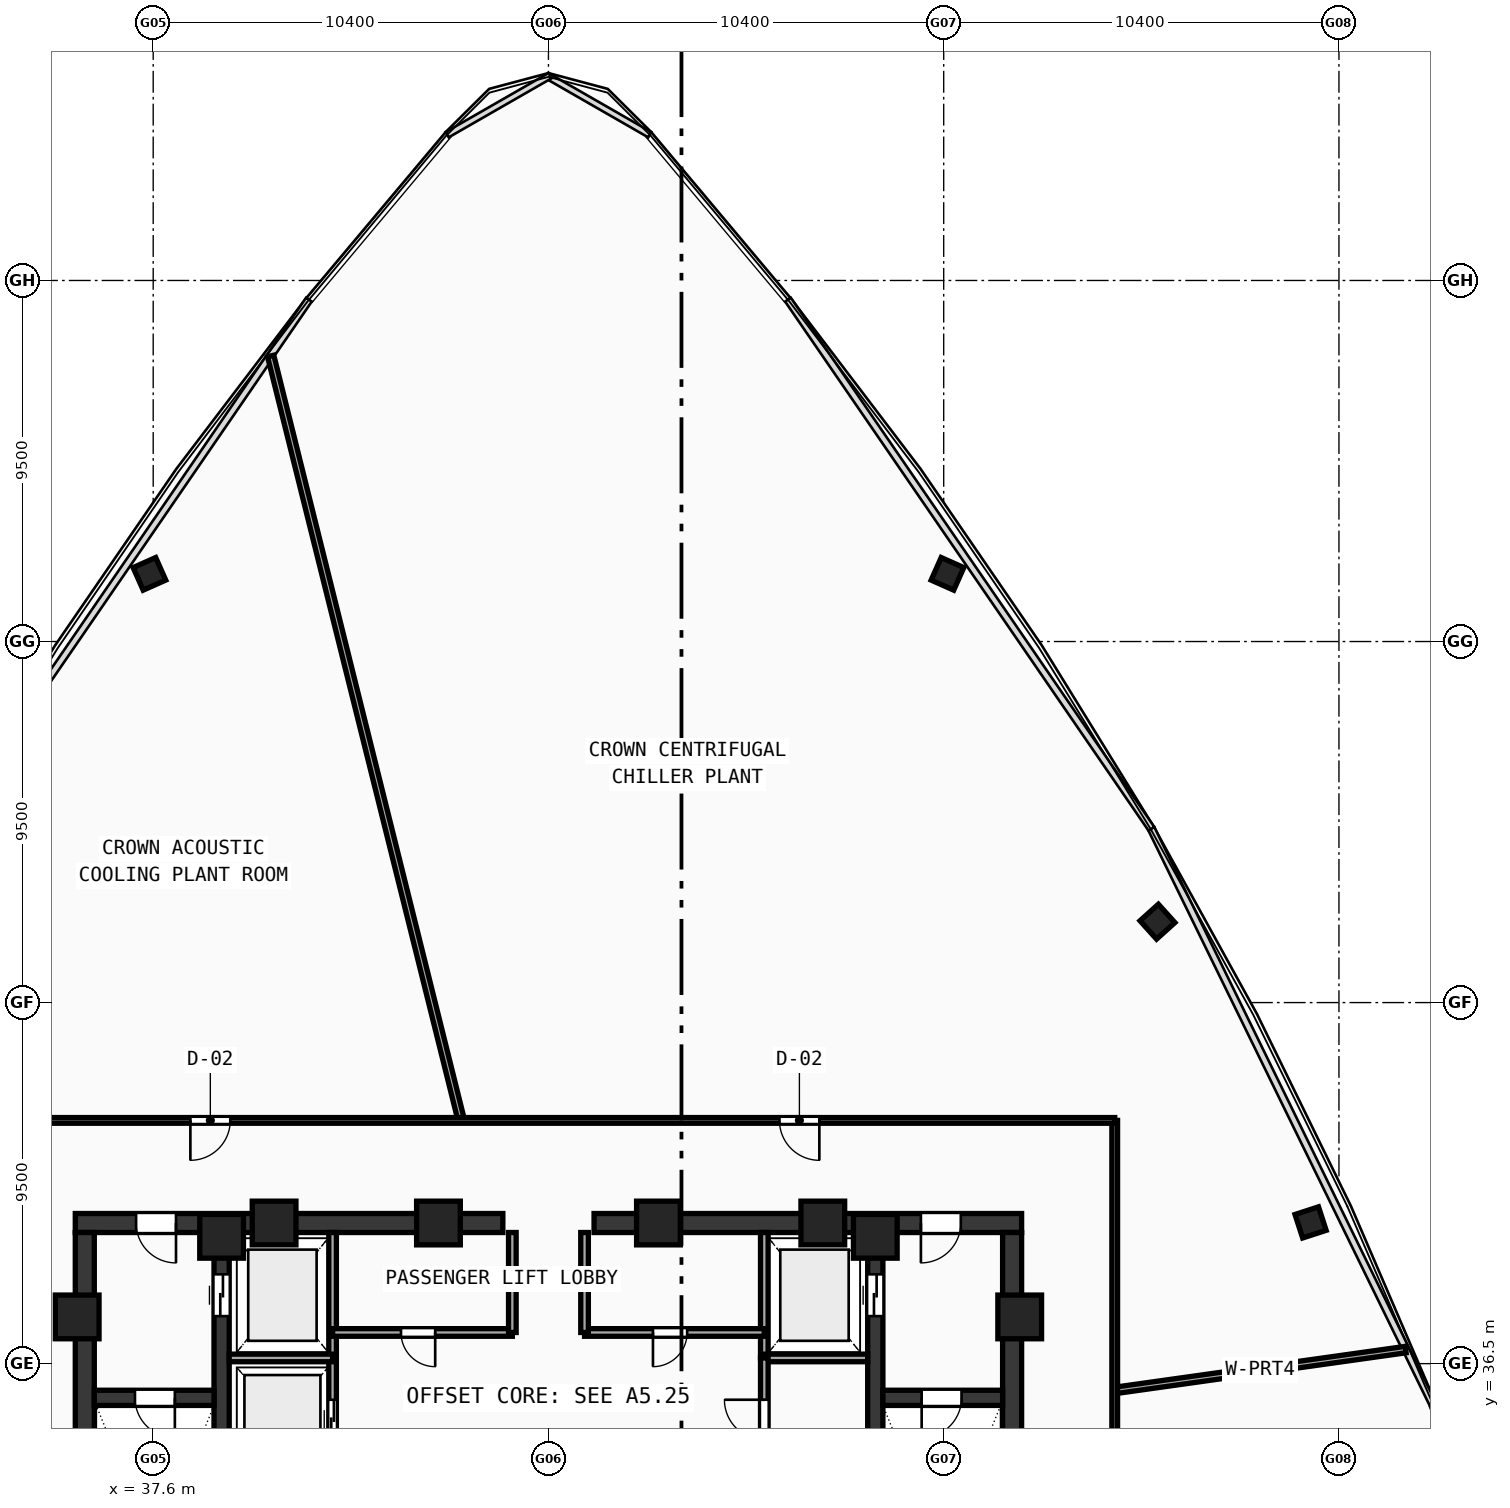
"""IFC4 building model, lengths in metres.
Left out: names, types, materials, properties, quantities, classifications, styles, units other than length and angle.
Written with IfcOpenShell. Run it as: python <this file> out.ifc"""

import sys

from ifc_helpers import new_model, si_unit, direction, frame, frame_2d, origin, origin_with_axes, origin_2d, place, context, subcontext, project, spatial, rectangle, hollow_rectangle, extrude, source, transform, mapped, element, fill, save


model = new_model("IFC4")
c1 = context("Model", 3, precision=1e-05, world=origin(), true_north=direction((0.0, 1.0)))
c2 = subcontext(c1, "Body", "Model", "MODEL_VIEW")
j1 = project(units=[si_unit("LENGTHUNIT", "METRE"), si_unit("PLANEANGLEUNIT", "RADIAN")], contexts=[c1])
p1 = place(None, origin())
s1 = spatial("IfcSite", under=j1, at=p1, CompositionType="ELEMENT")
p2 = place(p1, origin())
s2 = spatial("IfcBuilding", under=s1, at=p2, CompositionType="ELEMENT")
p3 = place(p2, frame((0.0, 0.0, 396.76)))
s3 = spatial("IfcBuildingStorey", under=s2, at=p3, CompositionType="ELEMENT", Elevation=396.76)
p4 = place(p3, frame((35.55, 40.2, 0.0), z_axis=(0.0, 0.0, 1.0), x_axis=(1.0, 0.0, 0.0)))
e1 = element("IfcWall", 1, at=p4, inside=s3, PredefinedType="SHEAR", context=c2, shape_type="SweptSolid", body=[
    extrude(rectangle(XDim=11.25, YDim=0.5, at=frame_2d((5.625, 0.0))), origin(), (0.0, 0.0, 1.0), 4.72),
])
p5 = place(p4, frame((1.6, 0.0, 0.0)))
e2 = element("IfcOpeningElement", 2, at=p5, cuts=e1, PredefinedType="OPENING", context=c2, shape_type="SweptSolid", body=[
    extrude(rectangle(XDim=1.05, YDim=2.1, at=frame_2d((0.525, 1.05))), frame((0.0, 0.26, 0.0), z_axis=(0.0, -1.0, 0.0), x_axis=(1.0, 0.0, 0.0)), (0.0, 0.0, 1.0), 0.52),
])
p6 = place(p3, frame((49.2, 40.2, 0.0), z_axis=(0.0, 0.0, 1.0), x_axis=(1.0, 0.0, 0.0)))
e3 = element("IfcWall", 3, at=p6, inside=s3, PredefinedType="SHEAR", context=c2, shape_type="SweptSolid", body=[
    extrude(rectangle(XDim=11.25, YDim=0.5, at=frame_2d((5.625, 0.0))), origin(), (0.0, 0.0, 1.0), 4.72),
])
p7 = place(p6, frame((8.6, 0.0, 0.0)))
e4 = element("IfcOpeningElement", 4, at=p7, cuts=e3, PredefinedType="OPENING", context=c2, shape_type="SweptSolid", body=[
    extrude(rectangle(XDim=1.05, YDim=2.1, at=frame_2d((0.525, 1.05))), frame((0.0, 0.26, 0.0), z_axis=(0.0, -1.0, 0.0), x_axis=(1.0, 0.0, 0.0)), (0.0, 0.0, 1.0), 0.52),
])
for number, where, z_axis, x_axis in (
    (5, (35.8, 27.75, 0.0), (0.0, 0.0, 1.0), (0.0, 1.0, 0.0)),
    (6, (60.2, 27.75, 0.0), (0.0, 0.0, 1.0), (0.0, 1.0, 0.0)),
):
    element("IfcWall", number, at=place(p3, frame(where, z_axis=z_axis, x_axis=x_axis)), inside=s3, PredefinedType="SHEAR", context=c2, shape_type="SweptSolid", body=[
        extrude(rectangle(XDim=12.2, YDim=0.5, at=frame_2d((6.1, 0.0))), origin(), (0.0, 0.0, 1.0), 4.72),
    ])
p8 = place(p3, frame((39.4, 27.75, 0.0), z_axis=(0.0, 0.0, 1.0), x_axis=(0.0, 1.0, 0.0)))
e7 = element("IfcWall", 7, at=p8, inside=s3, PredefinedType="SHEAR", context=c2, shape_type="SweptSolid", body=[
    extrude(rectangle(XDim=12.2, YDim=0.4, at=frame_2d((6.1, 0.0))), origin(), (0.0, 0.0, 1.0), 4.72),
])
p9 = place(p8, frame((10.0, 0.0, 0.0)))
e8 = element("IfcOpeningElement", 8, at=p9, cuts=e7, PredefinedType="OPENING", context=c2, shape_type="SweptSolid", body=[
    extrude(rectangle(XDim=1.1, YDim=2.1, at=frame_2d((0.55, 1.05))), frame((0.0, 0.21, 0.0), z_axis=(0.0, -1.0, 0.0), x_axis=(1.0, 0.0, 0.0)), (0.0, 0.0, 1.0), 0.42),
])
p10 = place(p3, frame((56.6, 27.75, 0.0), z_axis=(0.0, 0.0, 1.0), x_axis=(0.0, 1.0, 0.0)))
e9 = element("IfcWall", 9, at=p10, inside=s3, PredefinedType="SHEAR", context=c2, shape_type="SweptSolid", body=[
    extrude(rectangle(XDim=12.2, YDim=0.4, at=frame_2d((6.1, 0.0))), origin(), (0.0, 0.0, 1.0), 4.72),
])
p11 = place(p10, frame((10.0, 0.0, 0.0)))
e10 = element("IfcOpeningElement", 10, at=p11, cuts=e9, PredefinedType="OPENING", context=c2, shape_type="SweptSolid", body=[
    extrude(rectangle(XDim=1.1, YDim=2.1, at=frame_2d((0.55, 1.05))), frame((0.0, 0.21, 0.0), z_axis=(0.0, -1.0, 0.0), x_axis=(1.0, 0.0, 0.0)), (0.0, 0.0, 1.0), 0.42),
])
p12 = place(p3, frame((36.05, 35.6, 0.0), z_axis=(0.0, 0.0, 1.0), x_axis=(1.0, 0.0, 0.0)))
e11 = element("IfcWall", 11, at=p12, inside=s3, PredefinedType="SHEAR", context=c2, shape_type="SweptSolid", body=[
    extrude(rectangle(XDim=3.15, YDim=0.4, at=frame_2d((1.575, 0.0))), origin(), (0.0, 0.0, 1.0), 4.72),
])
p13 = place(p12, frame((1.07, 0.0, 0.0)))
e12 = element("IfcOpeningElement", 12, at=p13, cuts=e11, PredefinedType="OPENING", context=c2, shape_type="SweptSolid", body=[
    extrude(rectangle(XDim=1.05, YDim=2.1, at=frame_2d((0.525, 1.05))), frame((0.0, 0.21, 0.0), z_axis=(0.0, -1.0, 0.0), x_axis=(1.0, 0.0, 0.0)), (0.0, 0.0, 1.0), 0.42),
])
p14 = place(p3, frame((56.8, 35.6, 0.0), z_axis=(0.0, 0.0, 1.0), x_axis=(1.0, 0.0, 0.0)))
e13 = element("IfcWall", 13, at=p14, inside=s3, PredefinedType="SHEAR", context=c2, shape_type="SweptSolid", body=[
    extrude(rectangle(XDim=3.15, YDim=0.4, at=frame_2d((1.575, 0.0))), origin(), (0.0, 0.0, 1.0), 4.72),
])
p15 = place(p14, frame((1.02, 0.0, 0.0)))
e14 = element("IfcOpeningElement", 14, at=p15, cuts=e13, PredefinedType="OPENING", context=c2, shape_type="SweptSolid", body=[
    extrude(rectangle(XDim=1.05, YDim=2.1, at=frame_2d((0.525, 1.05))), frame((0.0, 0.21, 0.0), z_axis=(0.0, -1.0, 0.0), x_axis=(1.0, 0.0, 0.0)), (0.0, 0.0, 1.0), 0.42),
])
m1 = source(origin(), c2, "Body", "SweptSolid", [
    extrude(hollow_rectangle(XDim=1.15, YDim=1.15, WallThickness=0.048, at=origin_2d()), origin(), (0.0, 0.0, 1.0), 5.0),
])
for number, where, z_axis, x_axis in (
    (15, (60.4, 37.729, -0.28), (0.0, 0.0, 1.0), (1.0, 0.0, 0.0)),
    (16, (55.219, 40.2, -0.28), (0.0, 0.0, 1.0), (1.0, 0.0, 0.0)),
    (17, (50.894, 40.2, -0.28), (0.0, 0.0, 1.0), (1.0, 0.0, 0.0)),
    (18, (45.106, 40.2, -0.28), (0.0, 0.0, 1.0), (1.0, 0.0, 0.0)),
    (19, (40.781, 40.2, -0.28), (0.0, 0.0, 1.0), (1.0, 0.0, 0.0)),
    (20, (35.6, 37.729, -0.28), (0.0, 0.0, 1.0), (1.0, 0.0, 0.0)),
):
    element("IfcColumn", number, at=place(p3, frame(where, z_axis=z_axis, x_axis=x_axis)), inside=s3, PredefinedType="COLUMN", context=c2, shape_type="MappedRepresentation", body=[
        mapped(m1, transform((0.0, 0.0, 0.0), scale=1.0)),
    ])
m2 = source(origin(), c2, "Body", "SweptSolid", [
    extrude(hollow_rectangle(XDim=0.65, YDim=0.65, WallThickness=0.024, at=origin_2d()), origin(), (0.0, 0.0, 1.0), 5.0),
])
for number, where, z_axis, x_axis in (
    (21, (68.053, 40.216, -0.28), (0.0, 0.0, 1.0), (-0.309, 0.951, 0.0)),
    (22, (64.025, 48.129, -0.28), (0.0, 0.0, 1.0), (-0.669, 0.743, 0.0)),
    (23, (58.499, 57.281, -0.28), (0.0, 0.0, 1.0), (-0.914, 0.407, 0.0)),
    (24, (37.501, 57.281, -0.28), (0.0, 0.0, 1.0), (-0.914, -0.407, 0.0)),
):
    element("IfcColumn", number, at=place(p3, frame(where, z_axis=z_axis, x_axis=x_axis)), inside=s3, PredefinedType="COLUMN", context=c2, shape_type="MappedRepresentation", body=[
        mapped(m2, transform((0.0, 0.0, 0.0), scale=1.0)),
    ])
for number, where, z_axis, x_axis in (
    (25, (39.4, 39.85, -0.28), (0.0, 0.0, 1.0), (1.0, 0.0, 0.0)),
    (26, (56.6, 39.85, -0.28), (0.0, 0.0, 1.0), (1.0, 0.0, 0.0)),
):
    element("IfcColumn", number, at=place(p3, frame(where, z_axis=z_axis, x_axis=x_axis)), inside=s3, PredefinedType="COLUMN", context=c2, shape_type="MappedRepresentation", body=[
        mapped(m1, transform((0.0, 0.0, 0.0), scale=1.0)),
    ])
p16 = place(p3, frame((42.32, 33.5, 0.0), z_axis=(0.0, 0.0, 1.0), x_axis=(0.0, 1.0, 0.0)))
e27 = element("IfcWall", 27, at=p16, inside=s3, PredefinedType="SOLIDWALL", context=c2, shape_type="SweptSolid", body=[
    extrude(rectangle(XDim=6.45, YDim=0.2, at=frame_2d((3.225, 0.0))), origin(), (0.0, 0.0, 1.0), 4.72),
])
p17 = place(p16, frame((1.0, 0.0, 0.0)))
e28 = element("IfcOpeningElement", 28, at=p17, cuts=e27, PredefinedType="OPENING", context=c2, shape_type="SweptSolid", body=[
    extrude(rectangle(XDim=1.05, YDim=2.1, at=frame_2d((0.525, 1.05))), frame((0.0, 0.11, 0.0), z_axis=(0.0, -1.0, 0.0), x_axis=(1.0, 0.0, 0.0)), (0.0, 0.0, 1.0), 0.22),
])
p18 = place(p3, frame((39.6, 36.65, 0.0), z_axis=(0.0, 0.0, 1.0), x_axis=(1.0, 0.0, 0.0)))
e29 = element("IfcWall", 29, at=p18, inside=s3, PredefinedType="SOLIDWALL", context=c2, shape_type="SweptSolid", body=[
    extrude(rectangle(XDim=2.72, YDim=0.2, at=frame_2d((1.36, 0.0))), origin(), (0.0, 0.0, 1.0), 4.72),
])
p19 = place(p3, frame((53.68, 36.65, 0.0), z_axis=(0.0, 0.0, 1.0), x_axis=(0.0, 1.0, 0.0)))
e30 = element("IfcWall", 30, at=p19, inside=s3, PredefinedType="SOLIDWALL", context=c2, shape_type="SweptSolid", body=[
    extrude(rectangle(XDim=3.3, YDim=0.2, at=frame_2d((1.65, 0.0))), origin(), (0.0, 0.0, 1.0), 4.72),
])
p20 = place(p3, frame((53.68, 36.65, 0.0), z_axis=(0.0, 0.0, 1.0), x_axis=(1.0, 0.0, 0.0)))
e31 = element("IfcWall", 31, at=p20, inside=s3, PredefinedType="SOLIDWALL", context=c2, shape_type="SweptSolid", body=[
    extrude(rectangle(XDim=2.72, YDim=0.2, at=frame_2d((1.36, 0.0))), origin(), (0.0, 0.0, 1.0), 4.72),
])
p21 = place(p3, frame((42.32, 37.32, 0.0), z_axis=(0.0, 0.0, 1.0), x_axis=(1.0, 0.0, 0.0)))
e32 = element("IfcWall", 32, at=p21, inside=s3, PredefinedType="SOLIDWALL", context=c2, shape_type="SweptSolid", body=[
    extrude(rectangle(XDim=4.73, YDim=0.2, at=frame_2d((2.365, 0.0))), origin(), (0.0, 0.0, 1.0), 4.72),
])
p22 = place(p21, frame((1.8, 0.0, 0.0)))
e33 = element("IfcOpeningElement", 33, at=p22, cuts=e32, PredefinedType="OPENING", context=c2, shape_type="SweptSolid", body=[
    extrude(rectangle(XDim=0.9, YDim=2.1, at=frame_2d((0.45, 1.05))), frame((0.0, 0.11, 0.0), z_axis=(0.0, -1.0, 0.0), x_axis=(1.0, 0.0, 0.0)), (0.0, 0.0, 1.0), 0.22),
])
p23 = place(p3, frame((48.95, 37.32, 0.0), z_axis=(0.0, 0.0, 1.0), x_axis=(1.0, 0.0, 0.0)))
e34 = element("IfcWall", 34, at=p23, inside=s3, PredefinedType="SOLIDWALL", context=c2, shape_type="SweptSolid", body=[
    extrude(rectangle(XDim=4.73, YDim=0.2, at=frame_2d((2.365, 0.0))), origin(), (0.0, 0.0, 1.0), 4.72),
])
p24 = place(p23, frame((1.8, 0.0, 0.0)))
e35 = element("IfcOpeningElement", 35, at=p24, cuts=e34, PredefinedType="OPENING", context=c2, shape_type="SweptSolid", body=[
    extrude(rectangle(XDim=0.9, YDim=2.1, at=frame_2d((0.45, 1.05))), frame((0.0, 0.11, 0.0), z_axis=(0.0, -1.0, 0.0), x_axis=(1.0, 0.0, 0.0)), (0.0, 0.0, 1.0), 0.22),
])
for number, where, z_axis, x_axis in (
    (36, (47.05, 37.32, 0.0), (0.0, 0.0, 1.0), (0.0, 1.0, 0.0)),
    (37, (48.95, 37.32, 0.0), (0.0, 0.0, 1.0), (0.0, 1.0, 0.0)),
):
    element("IfcWall", number, at=place(p3, frame(where, z_axis=z_axis, x_axis=x_axis)), inside=s3, PredefinedType="SOLIDWALL", context=c2, shape_type="SweptSolid", body=[
        extrude(rectangle(XDim=2.63, YDim=0.2, at=frame_2d((1.315, 0.0))), origin(), (0.0, 0.0, 1.0), 4.72),
    ])
p25 = place(p3, frame((53.68, 27.6, 0.0), z_axis=(0.0, 0.0, 1.0), x_axis=(0.0, 1.0, 0.0)))
e38 = element("IfcWall", 38, at=p25, inside=s3, PredefinedType="SOLIDWALL", context=c2, shape_type="SweptSolid", body=[
    extrude(rectangle(XDim=9.05, YDim=0.2, at=frame_2d((4.525, 0.0))), origin(), (0.0, 0.0, 1.0), 4.72),
])
p26 = place(p25, frame((6.9, 0.0, 0.0)))
e39 = element("IfcOpeningElement", 39, at=p26, cuts=e38, PredefinedType="OPENING", context=c2, shape_type="SweptSolid", body=[
    extrude(rectangle(XDim=1.05, YDim=2.1, at=frame_2d((0.525, 1.05))), frame((0.0, 0.11, 0.0), z_axis=(0.0, -1.0, 0.0), x_axis=(1.0, 0.0, 0.0)), (0.0, 0.0, 1.0), 0.22),
])
p27 = place(p3, frame((62.9, 35.794, 0.0), z_axis=(0.0, 0.0, 1.0), x_axis=(0.990268414718, 0.139170639188, 0.0)))
e40 = element("IfcWall", 40, at=p27, inside=s3, PredefinedType="PARTITIONING", context=c2, shape_type="SweptSolid", body=[
    extrude(rectangle(XDim=7.731, YDim=0.17, at=frame_2d((3.865, 0.0))), origin(), (0.0, 0.0, 1.0), 4.12),
])
p28 = place(p3, frame((45.706, 42.9, 0.0), z_axis=(0.0, 0.0, 1.0), x_axis=(-0.241925907535, 0.970294725979, 0.0)))
e41 = element("IfcWall", 41, at=p28, inside=s3, PredefinedType="PARTITIONING", context=c2, shape_type="SweptSolid", body=[
    extrude(rectangle(XDim=20.729, YDim=0.17, at=frame_2d((10.365, 0.0))), origin(), (0.0, 0.0, 1.0), 4.12),
])
p29 = place(p3, frame((62.9, 24.9, 0.0), z_axis=(0.0, 0.0, 1.0), x_axis=(0.0, 1.0, 0.0)))
e42 = element("IfcWall", 42, at=p29, inside=s3, PredefinedType="PARTITIONING", context=c2, shape_type="SweptSolid", body=[
    extrude(rectangle(XDim=18.0, YDim=0.15, at=frame_2d((9.0, 0.0))), origin(), (0.0, 0.0, 1.0), 4.12),
])
p30 = place(p3, frame((62.9, 42.9, 0.0), z_axis=(0.0, 0.0, 1.0), x_axis=(-1.0, 0.0, 0.0)))
e43 = element("IfcWall", 43, at=p30, inside=s3, PredefinedType="PARTITIONING", context=c2, shape_type="SweptSolid", body=[
    extrude(rectangle(XDim=29.8, YDim=0.15, at=frame_2d((14.9, 0.0))), origin(), (0.0, 0.0, 1.0), 4.12),
])
p31 = place(p30, frame((7.772, 0.0, 0.0)))
e44 = element("IfcOpeningElement", 44, at=p31, cuts=e43, PredefinedType="OPENING", context=c2, shape_type="SweptSolid", body=[
    extrude(rectangle(XDim=1.05, YDim=2.1, at=frame_2d((0.525, 1.05))), frame((0.0, 0.085, 0.0), z_axis=(0.0, -1.0, 0.0), x_axis=(1.0, 0.0, 0.0)), (0.0, 0.0, 1.0), 0.17),
])
p32 = place(p30, frame((23.272, 0.0, 0.0)))
e45 = element("IfcOpeningElement", 45, at=p32, cuts=e43, PredefinedType="OPENING", context=c2, shape_type="SweptSolid", body=[
    extrude(rectangle(XDim=1.05, YDim=2.1, at=frame_2d((0.525, 1.05))), frame((0.0, 0.085, 0.0), z_axis=(0.0, -1.0, 0.0), x_axis=(1.0, 0.0, 0.0)), (0.0, 0.0, 1.0), 0.17),
])
m3 = source(origin(), c2, "Body", "SweptSolid", [
    extrude(rectangle(XDim=1.05, YDim=2.1, at=frame_2d((0.525, 1.05))), frame((0.0, 0.025, 0.0), z_axis=(0.0, -1.0, 0.0), x_axis=(1.0, 0.0, 0.0)), (0.0, 0.0, 1.0), 0.05),
])
p33 = place(p13, frame((1.05, 0.0, 0.0), z_axis=(0.0, 0.0, 1.0), x_axis=(-1.0, 0.0, 0.0)))
e46 = element("IfcDoor", 46, at=p33, inside=s3, OperationType="SINGLE_SWING_LEFT", PredefinedType="DOOR", context=c2, shape_type="MappedRepresentation", body=[
    mapped(m3, transform((0.0, 0.0, 0.0), scale=1.0)),
])
fill(e12, e46)
p34 = place(p15, frame((1.05, 0.0, 0.0), z_axis=(0.0, 0.0, 1.0), x_axis=(-1.0, 0.0, 0.0)))
e47 = element("IfcDoor", 47, at=p34, inside=s3, OperationType="SINGLE_SWING_RIGHT", PredefinedType="DOOR", context=c2, shape_type="MappedRepresentation", body=[
    mapped(m3, transform((0.0, 0.0, 0.0), scale=1.0)),
])
fill(e14, e47)
p35 = place(p5, frame((1.05, 0.0, 0.0), z_axis=(0.0, 0.0, 1.0), x_axis=(-1.0, 0.0, 0.0)))
e48 = element("IfcDoor", 48, at=p35, inside=s3, OperationType="SINGLE_SWING_LEFT", PredefinedType="DOOR", context=c2, shape_type="MappedRepresentation", body=[
    mapped(m3, transform((0.0, 0.0, 0.0), scale=1.0)),
])
fill(e2, e48)
p36 = place(p7, frame((1.05, 0.0, 0.0), z_axis=(0.0, 0.0, 1.0), x_axis=(-1.0, 0.0, 0.0)))
e49 = element("IfcDoor", 49, at=p36, inside=s3, OperationType="SINGLE_SWING_RIGHT", PredefinedType="DOOR", context=c2, shape_type="MappedRepresentation", body=[
    mapped(m3, transform((0.0, 0.0, 0.0), scale=1.0)),
])
fill(e4, e49)
m4 = source(origin(), c2, "Body", "SweptSolid", [
    extrude(rectangle(XDim=1.1, YDim=2.1, at=frame_2d((0.55, 1.05))), frame((0.0, 0.025, 0.0), z_axis=(0.0, -1.0, 0.0), x_axis=(1.0, 0.0, 0.0)), (0.0, 0.0, 1.0), 0.05),
])
p37 = place(p9, frame((1.1, 0.0, 0.0), z_axis=(0.0, 0.0, 1.0), x_axis=(-1.0, 0.0, 0.0)))
e50 = element("IfcDoor", 50, at=p37, inside=s3, OperationType="DOUBLE_DOOR_SLIDING", PredefinedType="DOOR", context=c2, shape_type="MappedRepresentation", body=[
    mapped(m4, transform((0.0, 0.0, 0.0), scale=1.0)),
])
fill(e8, e50)
p38 = place(p11, origin_with_axes())
e51 = element("IfcDoor", 51, at=p38, inside=s3, OperationType="DOUBLE_DOOR_SLIDING", PredefinedType="DOOR", context=c2, shape_type="MappedRepresentation", body=[
    mapped(m4, transform((0.0, 0.0, 0.0), scale=1.0)),
])
fill(e10, e51)
p39 = place(p17, origin_with_axes())
e52 = element("IfcDoor", 52, at=p39, inside=s3, OperationType="DOUBLE_DOOR_SLIDING", PredefinedType="DOOR", context=c2, shape_type="MappedRepresentation", body=[
    mapped(m3, transform((0.0, 0.0, 0.0), scale=1.0)),
])
fill(e28, e52)
m5 = source(origin(), c2, "Body", "SweptSolid", [
    extrude(rectangle(XDim=0.9, YDim=2.1, at=frame_2d((0.45, 1.05))), frame((0.0, 0.025, 0.0), z_axis=(0.0, -1.0, 0.0), x_axis=(1.0, 0.0, 0.0)), (0.0, 0.0, 1.0), 0.05),
])
p40 = place(p22, frame((0.9, 0.0, 0.0), z_axis=(0.0, 0.0, 1.0), x_axis=(-1.0, 0.0, 0.0)))
e53 = element("IfcDoor", 53, at=p40, inside=s3, OperationType="SINGLE_SWING_LEFT", PredefinedType="DOOR", context=c2, shape_type="MappedRepresentation", body=[
    mapped(m5, transform((0.0, 0.0, 0.0), scale=1.0)),
])
fill(e33, e53)
p41 = place(p24, frame((0.9, 0.0, 0.0), z_axis=(0.0, 0.0, 1.0), x_axis=(-1.0, 0.0, 0.0)))
e54 = element("IfcDoor", 54, at=p41, inside=s3, OperationType="SINGLE_SWING_RIGHT", PredefinedType="DOOR", context=c2, shape_type="MappedRepresentation", body=[
    mapped(m5, transform((0.0, 0.0, 0.0), scale=1.0)),
])
fill(e35, e54)
p42 = place(p26, origin_with_axes())
e55 = element("IfcDoor", 55, at=p42, inside=s3, OperationType="SINGLE_SWING_RIGHT", PredefinedType="DOOR", context=c2, shape_type="MappedRepresentation", body=[
    mapped(m3, transform((0.0, 0.0, 0.0), scale=1.0)),
])
fill(e39, e55)
p43 = place(p31, origin_with_axes())
e56 = element("IfcDoor", 56, at=p43, inside=s3, OperationType="SINGLE_SWING_LEFT", PredefinedType="DOOR", context=c2, shape_type="MappedRepresentation", body=[
    mapped(m3, transform((0.0, 0.0, 0.0), scale=1.0)),
])
fill(e44, e56)
p44 = place(p32, origin_with_axes())
e57 = element("IfcDoor", 57, at=p44, inside=s3, OperationType="SINGLE_SWING_RIGHT", PredefinedType="DOOR", context=c2, shape_type="MappedRepresentation", body=[
    mapped(m3, transform((0.0, 0.0, 0.0), scale=1.0)),
])
fill(e45, e57)
save(model, sys.argv[1])
